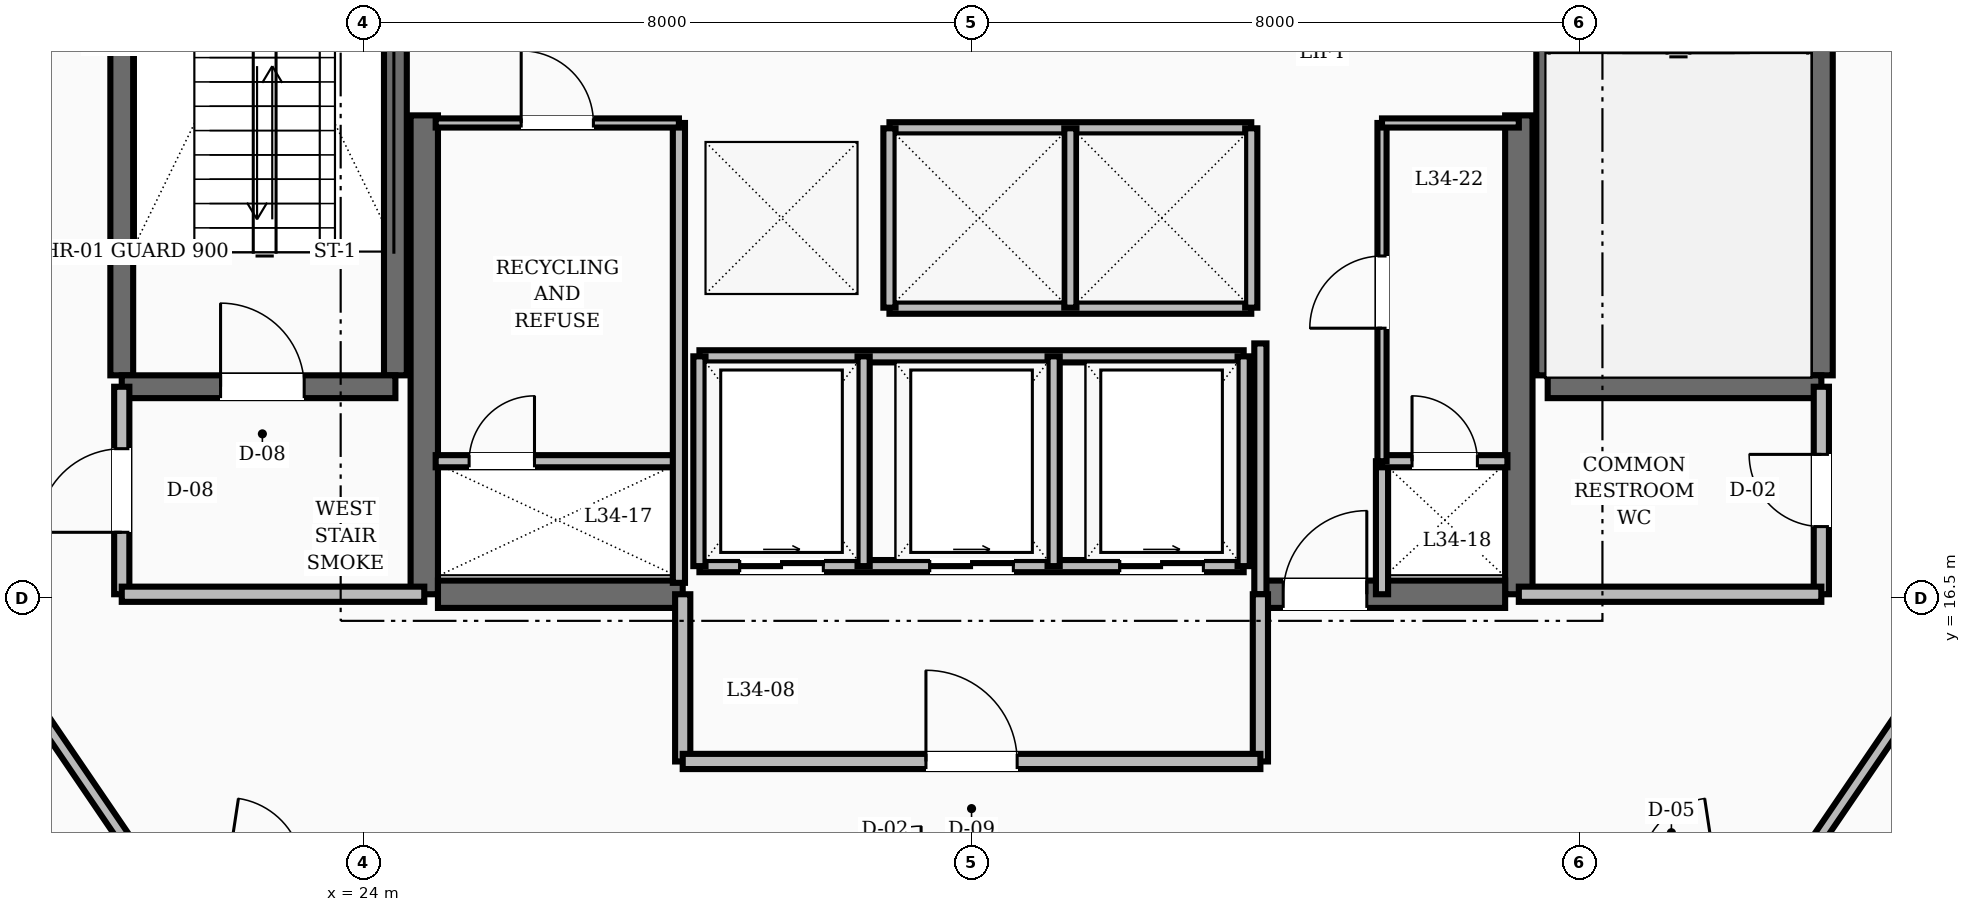
"""IFC4 building model, lengths in metres.
Left out: names, types, materials, properties, quantities, classifications, styles, units other than length and angle.
Written with IfcOpenShell. Run it as: python <this file> out.ifc"""

import sys

from ifc_helpers import new_model, si_unit, direction, frame, frame_2d, origin, place, context, subcontext, project, spatial, rectangle, extrude, element, fill, save


model = new_model("IFC4")
c1 = context("Model", 3, precision=1e-05, world=origin(), true_north=direction((0.0, 1.0)))
c2 = subcontext(c1, "Body", "Model", "MODEL_VIEW")
j1 = project(units=[si_unit("LENGTHUNIT", "METRE"), si_unit("PLANEANGLEUNIT", "RADIAN")], contexts=[c1])
p1 = place(None, origin())
s1 = spatial("IfcSite", under=j1, at=p1, CompositionType="ELEMENT")
p2 = place(p1, origin())
s2 = spatial("IfcBuilding", under=s1, at=p2, CompositionType="ELEMENT")
p3 = place(p2, frame((0.0, 0.0, 135.2)))
s3 = spatial("IfcBuildingStorey", under=s2, at=p3, CompositionType="ELEMENT", Elevation=135.2)
for number, where, z_axis, x_axis in (
    (1, (24.8, 16.55, 0.0), (0.0, 0.0, 1.0), (0.0, 1.0, 0.0)),
    (2, (39.2, 16.55, 0.0), (0.0, 0.0, 1.0), (0.0, 1.0, 0.0)),
):
    element("IfcWall", number, at=place(p3, frame(where, z_axis=z_axis, x_axis=x_axis)), inside=s3, PredefinedType="SHEAR", context=c2, shape_type="SweptSolid", body=[
        extrude(rectangle(XDim=6.3, YDim=0.36, at=frame_2d((3.15, 0.0))), origin(), (0.0, 0.0, 1.0), 3.6),
    ])
p4 = place(p3, frame((24.98, 16.55, 0.0), z_axis=(0.0, 0.0, 1.0), x_axis=(1.0, 0.0, 0.0)))
e3 = element("IfcWall", 3, at=p4, inside=s3, PredefinedType="SHEAR", context=c2, shape_type="SweptSolid", body=[
    extrude(rectangle(XDim=3.22, YDim=0.36, at=frame_2d((1.61, 0.0))), origin(), (0.0, 0.0, 1.0), 3.6),
])
p5 = place(p3, frame((35.8, 16.55, 0.0), z_axis=(0.0, 0.0, 1.0), x_axis=(1.0, 0.0, 0.0)))
e4 = element("IfcWall", 4, at=p5, inside=s3, PredefinedType="SHEAR", context=c2, shape_type="SweptSolid", body=[
    extrude(rectangle(XDim=3.22, YDim=0.36, at=frame_2d((1.61, 0.0))), origin(), (0.0, 0.0, 1.0), 3.6),
])
p6 = place(p5, frame((0.3, 0.0, 0.0)))
e5 = element("IfcOpeningElement", 5, at=p6, cuts=e4, PredefinedType="OPENING", context=c2, shape_type="SweptSolid", body=[
    extrude(rectangle(XDim=1.1, YDim=2.1, at=frame_2d((0.55, 1.05))), frame((0.0, 0.19, 0.0), z_axis=(0.0, -1.0, 0.0), x_axis=(1.0, 0.0, 0.0)), (0.0, 0.0, 1.0), 0.38),
])
for number, where, z_axis, x_axis in (
    (6, (20.82, 19.43, 0.0), (0.0, 0.0, 1.0), (0.0, 1.0, 0.0)),
    (7, (24.42, 19.43, 0.0), (0.0, 0.0, 1.0), (0.0, 1.0, 0.0)),
):
    element("IfcWall", number, at=place(p3, frame(where, z_axis=z_axis, x_axis=x_axis)), inside=s3, PredefinedType="SHEAR", context=c2, shape_type="SweptSolid", body=[
        extrude(rectangle(XDim=8.74, YDim=0.3, at=frame_2d((4.37, 0.0))), origin(), (0.0, 0.0, 1.0), 3.6),
    ])
p7 = place(p3, frame((20.82, 19.28, 0.0), z_axis=(0.0, 0.0, 1.0), x_axis=(1.0, 0.0, 0.0)))
e8 = element("IfcWall", 8, at=p7, inside=s3, PredefinedType="SHEAR", context=c2, shape_type="SweptSolid", body=[
    extrude(rectangle(XDim=3.6, YDim=0.3, at=frame_2d((1.8, 0.0))), origin(), (0.0, 0.0, 1.0), 3.6),
])
p8 = place(p7, frame((1.3, 0.0, 0.0)))
e9 = element("IfcOpeningElement", 9, at=p8, cuts=e8, PredefinedType="OPENING", context=c2, shape_type="SweptSolid", body=[
    extrude(rectangle(XDim=1.1, YDim=2.1, at=frame_2d((0.55, 1.05))), frame((0.0, 0.16, 0.0), z_axis=(0.0, -1.0, 0.0), x_axis=(1.0, 0.0, 0.0)), (0.0, 0.0, 1.0), 0.32),
])
for number, where, z_axis, x_axis in (
    (10, (43.18, 19.43, 0.0), (0.0, 0.0, 1.0), (0.0, 1.0, 0.0)),
    (11, (39.58, 19.43, 0.0), (0.0, 0.0, 1.0), (0.0, 1.0, 0.0)),
):
    element("IfcWall", number, at=place(p3, frame(where, z_axis=z_axis, x_axis=x_axis)), inside=s3, PredefinedType="SHEAR", context=c2, shape_type="SweptSolid", body=[
        extrude(rectangle(XDim=8.74, YDim=0.3, at=frame_2d((4.37, 0.0))), origin(), (0.0, 0.0, 1.0), 3.6),
    ])
p9 = place(p3, frame((39.58, 19.28, 0.0), z_axis=(0.0, 0.0, 1.0), x_axis=(1.0, 0.0, 0.0)))
e12 = element("IfcWall", 12, at=p9, inside=s3, PredefinedType="SHEAR", context=c2, shape_type="SweptSolid", body=[
    extrude(rectangle(XDim=3.6, YDim=0.3, at=frame_2d((1.8, 0.0))), origin(), (0.0, 0.0, 1.0), 3.6),
])
p10 = place(p3, frame((20.82, 16.55, 0.0), z_axis=(0.0, 0.0, 1.0), x_axis=(0.0, 1.0, 0.0)))
e13 = element("IfcWall", 13, at=p10, inside=s3, PredefinedType="SOLIDWALL", context=c2, shape_type="SweptSolid", body=[
    extrude(rectangle(XDim=2.73, YDim=0.2, at=frame_2d((1.365, 0.0))), origin(), (0.0, 0.0, 1.0), 2.8),
])
p11 = place(p10, frame((0.815, 0.0, 0.0)))
e14 = element("IfcOpeningElement", 14, at=p11, cuts=e13, PredefinedType="OPENING", context=c2, shape_type="SweptSolid", body=[
    extrude(rectangle(XDim=1.1, YDim=2.1, at=frame_2d((0.55, 1.05))), frame((0.0, 0.11, 0.0), z_axis=(0.0, -1.0, 0.0), x_axis=(1.0, 0.0, 0.0)), (0.0, 0.0, 1.0), 0.22),
])
p12 = place(p3, frame((20.82, 16.55, 0.0), z_axis=(0.0, 0.0, 1.0), x_axis=(1.0, 0.0, 0.0)))
e15 = element("IfcWall", 15, at=p12, inside=s3, PredefinedType="SOLIDWALL", context=c2, shape_type="SweptSolid", body=[
    extrude(rectangle(XDim=3.98, YDim=0.2, at=frame_2d((1.99, 0.0))), origin(), (0.0, 0.0, 1.0), 2.8),
])
p13 = place(p3, frame((43.18, 16.55, 0.0), z_axis=(0.0, 0.0, 1.0), x_axis=(0.0, 1.0, 0.0)))
e16 = element("IfcWall", 16, at=p13, inside=s3, PredefinedType="SOLIDWALL", context=c2, shape_type="SweptSolid", body=[
    extrude(rectangle(XDim=2.73, YDim=0.2, at=frame_2d((1.365, 0.0))), origin(), (0.0, 0.0, 1.0), 2.8),
])
p14 = place(p13, frame((0.89, 0.0, 0.0)))
e17 = element("IfcOpeningElement", 17, at=p14, cuts=e16, PredefinedType="OPENING", context=c2, shape_type="SweptSolid", body=[
    extrude(rectangle(XDim=0.95, YDim=2.1, at=frame_2d((0.475, 1.05))), frame((0.0, 0.11, 0.0), z_axis=(0.0, -1.0, 0.0), x_axis=(1.0, 0.0, 0.0)), (0.0, 0.0, 1.0), 0.22),
])
p15 = place(p3, frame((39.2, 16.55, 0.0), z_axis=(0.0, 0.0, 1.0), x_axis=(1.0, 0.0, 0.0)))
e18 = element("IfcWall", 18, at=p15, inside=s3, PredefinedType="SOLIDWALL", context=c2, shape_type="SweptSolid", body=[
    extrude(rectangle(XDim=3.98, YDim=0.2, at=frame_2d((1.99, 0.0))), origin(), (0.0, 0.0, 1.0), 2.8),
])
p16 = place(p3, frame((35.8, 16.55, 0.0), z_axis=(0.0, 0.0, 1.0), x_axis=(0.0, 1.0, 0.0)))
e19 = element("IfcWall", 19, at=p16, inside=s3, PredefinedType="SOLIDWALL", context=c2, shape_type="SweptSolid", body=[
    extrude(rectangle(XDim=3.3, YDim=0.16, at=frame_2d((1.65, 0.0))), origin(), (0.0, 0.0, 1.0), 2.8),
])
p17 = place(p3, frame((37.4, 16.55, 0.0), z_axis=(0.0, 0.0, 1.0), x_axis=(0.0, 1.0, 0.0)))
e20 = element("IfcWall", 20, at=p17, inside=s3, PredefinedType="SOLIDWALL", context=c2, shape_type="SweptSolid", body=[
    extrude(rectangle(XDim=1.75, YDim=0.16, at=frame_2d((0.875, 0.0))), origin(), (0.0, 0.0, 1.0), 2.8),
])
for number, where, z_axis, x_axis in (
    (21, (28.2, 14.35, 0.0), (0.0, 0.0, 1.0), (0.0, 1.0, 0.0)),
    (22, (35.8, 14.35, 0.0), (0.0, 0.0, 1.0), (0.0, 1.0, 0.0)),
):
    element("IfcWall", number, at=place(p3, frame(where, z_axis=z_axis, x_axis=x_axis)), inside=s3, PredefinedType="SOLIDWALL", context=c2, shape_type="SweptSolid", body=[
        extrude(rectangle(XDim=2.2, YDim=0.2, at=frame_2d((1.1, 0.0))), origin(), (0.0, 0.0, 1.0), 2.8),
    ])
p18 = place(p3, frame((28.2, 14.35, 0.0), z_axis=(0.0, 0.0, 1.0), x_axis=(1.0, 0.0, 0.0)))
e23 = element("IfcWall", 23, at=p18, inside=s3, PredefinedType="SOLIDWALL", context=c2, shape_type="SweptSolid", body=[
    extrude(rectangle(XDim=7.6, YDim=0.2, at=frame_2d((3.8, 0.0))), origin(), (0.0, 0.0, 1.0), 2.8),
])
p19 = place(p18, frame((3.2, 0.0, 0.0)))
e24 = element("IfcOpeningElement", 24, at=p19, cuts=e23, PredefinedType="OPENING", context=c2, shape_type="SweptSolid", body=[
    extrude(rectangle(XDim=1.2, YDim=2.1, at=frame_2d((0.6, 1.05))), frame((0.0, 0.11, 0.0), z_axis=(0.0, -1.0, 0.0), x_axis=(1.0, 0.0, 0.0)), (0.0, 0.0, 1.0), 0.22),
])
for number, where, z_axis, x_axis in (
    (25, (30.92, 22.68, 0.0), (0.0, 0.0, 1.0), (1.0, 0.0, 0.0)),
    (26, (30.92, 20.32, 0.0), (0.0, 0.0, 1.0), (1.0, 0.0, 0.0)),
):
    element("IfcWall", number, at=place(p3, frame(where, z_axis=z_axis, x_axis=x_axis)), inside=s3, PredefinedType="SOLIDWALL", context=c2, shape_type="SweptSolid", body=[
        extrude(rectangle(XDim=4.76, YDim=0.16, at=frame_2d((2.38, 0.0))), origin(), (0.0, 0.0, 1.0), 2.8),
    ])
for number, where, z_axis, x_axis in (
    (27, (30.92, 20.32, 0.0), (0.0, 0.0, 1.0), (0.0, 1.0, 0.0)),
    (28, (33.3, 20.32, 0.0), (0.0, 0.0, 1.0), (0.0, 1.0, 0.0)),
    (29, (35.68, 20.32, 0.0), (0.0, 0.0, 1.0), (0.0, 1.0, 0.0)),
):
    element("IfcWall", number, at=place(p3, frame(where, z_axis=z_axis, x_axis=x_axis)), inside=s3, PredefinedType="SOLIDWALL", context=c2, shape_type="SweptSolid", body=[
        extrude(rectangle(XDim=2.36, YDim=0.16, at=frame_2d((1.18, 0.0))), origin(), (0.0, 0.0, 1.0), 2.8),
    ])
p20 = place(p3, frame((28.42, 16.92, 0.0), z_axis=(0.0, 0.0, 1.0), x_axis=(1.0, 0.0, 0.0)))
e30 = element("IfcWall", 30, at=p20, inside=s3, PredefinedType="SOLIDWALL", context=c2, shape_type="SweptSolid", body=[
    extrude(rectangle(XDim=7.16, YDim=0.16, at=frame_2d((3.58, 0.0))), origin(), (0.0, 0.0, 1.0), 2.8),
])
p21 = place(p20, frame((0.53, 0.0, 0.0)))
e31 = element("IfcOpeningElement", 31, at=p21, cuts=e30, PredefinedType="OPENING", context=c2, shape_type="SweptSolid", body=[
    extrude(rectangle(XDim=1.1, YDim=2.15, at=frame_2d((0.55, 1.075))), frame((0.0, 0.09, 0.0), z_axis=(0.0, -1.0, 0.0), x_axis=(1.0, 0.0, 0.0)), (0.0, 0.0, 1.0), 0.18),
])
p22 = place(p20, frame((3.03, 0.0, 0.0)))
e32 = element("IfcOpeningElement", 32, at=p22, cuts=e30, PredefinedType="OPENING", context=c2, shape_type="SweptSolid", body=[
    extrude(rectangle(XDim=1.1, YDim=2.15, at=frame_2d((0.55, 1.075))), frame((0.0, 0.09, 0.0), z_axis=(0.0, -1.0, 0.0), x_axis=(1.0, 0.0, 0.0)), (0.0, 0.0, 1.0), 0.18),
])
p23 = place(p20, frame((5.53, 0.0, 0.0)))
e33 = element("IfcOpeningElement", 33, at=p23, cuts=e30, PredefinedType="OPENING", context=c2, shape_type="SweptSolid", body=[
    extrude(rectangle(XDim=1.1, YDim=2.15, at=frame_2d((0.55, 1.075))), frame((0.0, 0.09, 0.0), z_axis=(0.0, -1.0, 0.0), x_axis=(1.0, 0.0, 0.0)), (0.0, 0.0, 1.0), 0.18),
])
p24 = place(p3, frame((28.42, 19.68, 0.0), z_axis=(0.0, 0.0, 1.0), x_axis=(1.0, 0.0, 0.0)))
e34 = element("IfcWall", 34, at=p24, inside=s3, PredefinedType="SOLIDWALL", context=c2, shape_type="SweptSolid", body=[
    extrude(rectangle(XDim=7.16, YDim=0.16, at=frame_2d((3.58, 0.0))), origin(), (0.0, 0.0, 1.0), 2.8),
])
for number, where, z_axis, x_axis in (
    (35, (28.42, 16.92, 0.0), (0.0, 0.0, 1.0), (0.0, 1.0, 0.0)),
    (36, (30.58, 16.92, 0.0), (0.0, 0.0, 1.0), (0.0, 1.0, 0.0)),
    (37, (33.08, 16.92, 0.0), (0.0, 0.0, 1.0), (0.0, 1.0, 0.0)),
    (38, (35.58, 16.92, 0.0), (0.0, 0.0, 1.0), (0.0, 1.0, 0.0)),
):
    element("IfcWall", number, at=place(p3, frame(where, z_axis=z_axis, x_axis=x_axis)), inside=s3, PredefinedType="SOLIDWALL", context=c2, shape_type="SweptSolid", body=[
        extrude(rectangle(XDim=2.76, YDim=0.16, at=frame_2d((1.38, 0.0))), origin(), (0.0, 0.0, 1.0), 2.8),
    ])
p25 = place(p3, frame((24.95, 18.3, 0.0), z_axis=(0.0, 0.0, 1.0), x_axis=(1.0, 0.0, 0.0)))
e39 = element("IfcWall", 39, at=p25, inside=s3, PredefinedType="SOLIDWALL", context=c2, shape_type="SweptSolid", body=[
    extrude(rectangle(XDim=3.2, YDim=0.16, at=frame_2d((1.6, 0.0))), origin(), (0.0, 0.0, 1.0), 2.8),
])
p26 = place(p25, frame((0.44, 0.0, 0.0)))
e40 = element("IfcOpeningElement", 40, at=p26, cuts=e39, PredefinedType="OPENING", context=c2, shape_type="SweptSolid", body=[
    extrude(rectangle(XDim=0.86, YDim=2.05, at=frame_2d((0.43, 1.025))), frame((0.0, 0.09, 0.0), z_axis=(0.0, -1.0, 0.0), x_axis=(1.0, 0.0, 0.0)), (0.0, 0.0, 1.0), 0.18),
])
p27 = place(p3, frame((28.15, 16.7, 0.0), z_axis=(0.0, 0.0, 1.0), x_axis=(0.0, 1.0, 0.0)))
e41 = element("IfcWall", 41, at=p27, inside=s3, PredefinedType="SOLIDWALL", context=c2, shape_type="SweptSolid", body=[
    extrude(rectangle(XDim=6.05, YDim=0.16, at=frame_2d((3.025, 0.0))), origin(), (0.0, 0.0, 1.0), 2.8),
])
p28 = place(p3, frame((37.4, 18.3, 0.0), z_axis=(0.0, 0.0, 1.0), x_axis=(1.0, 0.0, 0.0)))
e42 = element("IfcWall", 42, at=p28, inside=s3, PredefinedType="SOLIDWALL", context=c2, shape_type="SweptSolid", body=[
    extrude(rectangle(XDim=1.65, YDim=0.16, at=frame_2d((0.825, 0.0))), origin(), (0.0, 0.0, 1.0), 2.8),
])
p29 = place(p28, frame((0.395, 0.0, 0.0)))
e43 = element("IfcOpeningElement", 43, at=p29, cuts=e42, PredefinedType="OPENING", context=c2, shape_type="SweptSolid", body=[
    extrude(rectangle(XDim=0.86, YDim=2.1, at=frame_2d((0.43, 1.05))), frame((0.0, 0.09, 0.0), z_axis=(0.0, -1.0, 0.0), x_axis=(1.0, 0.0, 0.0)), (0.0, 0.0, 1.0), 0.18),
])
p30 = place(p3, frame((24.95, 22.75, 0.0), z_axis=(0.0, 0.0, 1.0), x_axis=(1.0, 0.0, 0.0)))
e44 = element("IfcWall", 44, at=p30, inside=s3, PredefinedType="PARTITIONING", context=c2, shape_type="SweptSolid", body=[
    extrude(rectangle(XDim=3.2, YDim=0.12, at=frame_2d((1.6, 0.0))), origin(), (0.0, 0.0, 1.0), 2.8),
])
p31 = place(p30, frame((1.125, 0.0, 0.0)))
e45 = element("IfcOpeningElement", 45, at=p31, cuts=e44, PredefinedType="OPENING", context=c2, shape_type="SweptSolid", body=[
    extrude(rectangle(XDim=0.95, YDim=2.1, at=frame_2d((0.475, 1.05))), frame((0.0, 0.07, 0.0), z_axis=(0.0, -1.0, 0.0), x_axis=(1.0, 0.0, 0.0)), (0.0, 0.0, 1.0), 0.14),
])
p32 = place(p3, frame((37.4, 18.3, 0.0), z_axis=(0.0, 0.0, 1.0), x_axis=(0.0, 1.0, 0.0)))
e46 = element("IfcWall", 46, at=p32, inside=s3, PredefinedType="PARTITIONING", context=c2, shape_type="SweptSolid", body=[
    extrude(rectangle(XDim=4.45, YDim=0.12, at=frame_2d((2.225, 0.0))), origin(), (0.0, 0.0, 1.0), 2.8),
])
p33 = place(p32, frame((1.75, 0.0, 0.0)))
e47 = element("IfcOpeningElement", 47, at=p33, cuts=e46, PredefinedType="OPENING", context=c2, shape_type="SweptSolid", body=[
    extrude(rectangle(XDim=0.95, YDim=2.1, at=frame_2d((0.475, 1.05))), frame((0.0, 0.07, 0.0), z_axis=(0.0, -1.0, 0.0), x_axis=(1.0, 0.0, 0.0)), (0.0, 0.0, 1.0), 0.14),
])
p34 = place(p3, frame((37.4, 22.75, 0.0), z_axis=(0.0, 0.0, 1.0), x_axis=(1.0, 0.0, 0.0)))
e48 = element("IfcWall", 48, at=p34, inside=s3, PredefinedType="PARTITIONING", context=c2, shape_type="SweptSolid", body=[
    extrude(rectangle(XDim=1.8, YDim=0.12, at=frame_2d((0.9, 0.0))), origin(), (0.0, 0.0, 1.0), 2.8),
])
for number, where, z_axis, x_axis in (
    (49, (19.35, 15.548, 0.0), (0.0, 0.0, 1.0), (0.563, -0.827, 0.0)),
    (50, (42.95, 13.05, 0.0), (0.0, 0.0, 1.0), (0.563, 0.827, 0.0)),
):
    element("IfcWall", number, at=place(p3, frame(where, z_axis=z_axis, x_axis=x_axis)), inside=s3, PredefinedType="SOLIDWALL", context=c2, shape_type="SweptSolid", body=[
        extrude(rectangle(XDim=3.021, YDim=0.16, at=frame_2d((1.511, 0.0))), origin(), (0.0, 0.0, 1.0), 2.8),
    ])
p35 = place(p8, origin())
e51 = element("IfcDoor", 51, at=p35, inside=s3, OperationType="SINGLE_SWING_LEFT", PredefinedType="DOOR", context=c2, shape_type="SweptSolid", body=[
    extrude(rectangle(XDim=1.1, YDim=2.1, at=frame_2d((0.55, 1.05))), frame((0.0, 0.025, 0.0), z_axis=(0.0, -1.0, 0.0), x_axis=(1.0, 0.0, 0.0)), (0.0, 0.0, 1.0), 0.05),
])
fill(e9, e51)
p36 = place(p11, origin())
e52 = element("IfcDoor", 52, at=p36, inside=s3, OperationType="SINGLE_SWING_LEFT", PredefinedType="DOOR", context=c2, shape_type="SweptSolid", body=[
    extrude(rectangle(XDim=1.1, YDim=2.1, at=frame_2d((0.55, 1.05))), frame((0.0, 0.025, 0.0), z_axis=(0.0, -1.0, 0.0), x_axis=(1.0, 0.0, 0.0)), (0.0, 0.0, 1.0), 0.05),
])
fill(e14, e52)
p37 = place(p14, origin())
e53 = element("IfcDoor", 53, at=p37, inside=s3, OperationType="SINGLE_SWING_RIGHT", PredefinedType="DOOR", context=c2, shape_type="SweptSolid", body=[
    extrude(rectangle(XDim=0.95, YDim=2.1, at=frame_2d((0.475, 1.05))), frame((0.0, 0.025, 0.0), z_axis=(0.0, -1.0, 0.0), x_axis=(1.0, 0.0, 0.0)), (0.0, 0.0, 1.0), 0.05),
])
fill(e17, e53)
p38 = place(p6, origin())
e54 = element("IfcDoor", 54, at=p38, inside=s3, OperationType="SINGLE_SWING_RIGHT", PredefinedType="DOOR", context=c2, shape_type="SweptSolid", body=[
    extrude(rectangle(XDim=1.1, YDim=2.1, at=frame_2d((0.55, 1.05))), frame((0.0, 0.025, 0.0), z_axis=(0.0, -1.0, 0.0), x_axis=(1.0, 0.0, 0.0)), (0.0, 0.0, 1.0), 0.05),
])
fill(e5, e54)
p39 = place(p19, origin())
e55 = element("IfcDoor", 55, at=p39, inside=s3, OperationType="SINGLE_SWING_LEFT", PredefinedType="DOOR", context=c2, shape_type="SweptSolid", body=[
    extrude(rectangle(XDim=1.2, YDim=2.1, at=frame_2d((0.6, 1.05))), frame((0.0, 0.025, 0.0), z_axis=(0.0, -1.0, 0.0), x_axis=(1.0, 0.0, 0.0)), (0.0, 0.0, 1.0), 0.05),
])
fill(e24, e55)
p40 = place(p21, origin())
e56 = element("IfcDoor", 56, at=p40, inside=s3, OperationType="SLIDING_TO_RIGHT", PredefinedType="DOOR", context=c2, shape_type="SweptSolid", body=[
    extrude(rectangle(XDim=1.1, YDim=2.15, at=frame_2d((0.55, 1.075))), frame((0.0, 0.025, 0.0), z_axis=(0.0, -1.0, 0.0), x_axis=(1.0, 0.0, 0.0)), (0.0, 0.0, 1.0), 0.05),
])
fill(e31, e56)
p41 = place(p22, origin())
e57 = element("IfcDoor", 57, at=p41, inside=s3, OperationType="SLIDING_TO_RIGHT", PredefinedType="DOOR", context=c2, shape_type="SweptSolid", body=[
    extrude(rectangle(XDim=1.1, YDim=2.15, at=frame_2d((0.55, 1.075))), frame((0.0, 0.025, 0.0), z_axis=(0.0, -1.0, 0.0), x_axis=(1.0, 0.0, 0.0)), (0.0, 0.0, 1.0), 0.05),
])
fill(e32, e57)
p42 = place(p23, origin())
e58 = element("IfcDoor", 58, at=p42, inside=s3, OperationType="SLIDING_TO_RIGHT", PredefinedType="DOOR", context=c2, shape_type="SweptSolid", body=[
    extrude(rectangle(XDim=1.1, YDim=2.15, at=frame_2d((0.55, 1.075))), frame((0.0, 0.025, 0.0), z_axis=(0.0, -1.0, 0.0), x_axis=(1.0, 0.0, 0.0)), (0.0, 0.0, 1.0), 0.05),
])
fill(e33, e58)
p43 = place(p26, origin())
e59 = element("IfcDoor", 59, at=p43, inside=s3, OperationType="SINGLE_SWING_RIGHT", PredefinedType="TRAPDOOR", context=c2, shape_type="SweptSolid", body=[
    extrude(rectangle(XDim=0.86, YDim=2.05, at=frame_2d((0.43, 1.025))), frame((0.0, 0.025, 0.0), z_axis=(0.0, -1.0, 0.0), x_axis=(1.0, 0.0, 0.0)), (0.0, 0.0, 1.0), 0.05),
])
fill(e40, e59)
p44 = place(p29, origin())
e60 = element("IfcDoor", 60, at=p44, inside=s3, OperationType="SINGLE_SWING_LEFT", PredefinedType="TRAPDOOR", context=c2, shape_type="SweptSolid", body=[
    extrude(rectangle(XDim=0.86, YDim=2.1, at=frame_2d((0.43, 1.05))), frame((0.0, 0.025, 0.0), z_axis=(0.0, -1.0, 0.0), x_axis=(1.0, 0.0, 0.0)), (0.0, 0.0, 1.0), 0.05),
])
fill(e43, e60)
p45 = place(p31, origin())
e61 = element("IfcDoor", 61, at=p45, inside=s3, OperationType="SINGLE_SWING_LEFT", PredefinedType="DOOR", context=c2, shape_type="SweptSolid", body=[
    extrude(rectangle(XDim=0.95, YDim=2.1, at=frame_2d((0.475, 1.05))), frame((0.0, 0.025, 0.0), z_axis=(0.0, -1.0, 0.0), x_axis=(1.0, 0.0, 0.0)), (0.0, 0.0, 1.0), 0.05),
])
fill(e45, e61)
p46 = place(p33, origin())
e62 = element("IfcDoor", 62, at=p46, inside=s3, OperationType="SINGLE_SWING_LEFT", PredefinedType="DOOR", context=c2, shape_type="SweptSolid", body=[
    extrude(rectangle(XDim=0.95, YDim=2.1, at=frame_2d((0.475, 1.05))), frame((0.0, 0.025, 0.0), z_axis=(0.0, -1.0, 0.0), x_axis=(1.0, 0.0, 0.0)), (0.0, 0.0, 1.0), 0.05),
])
fill(e47, e62)
save(model, sys.argv[1])
